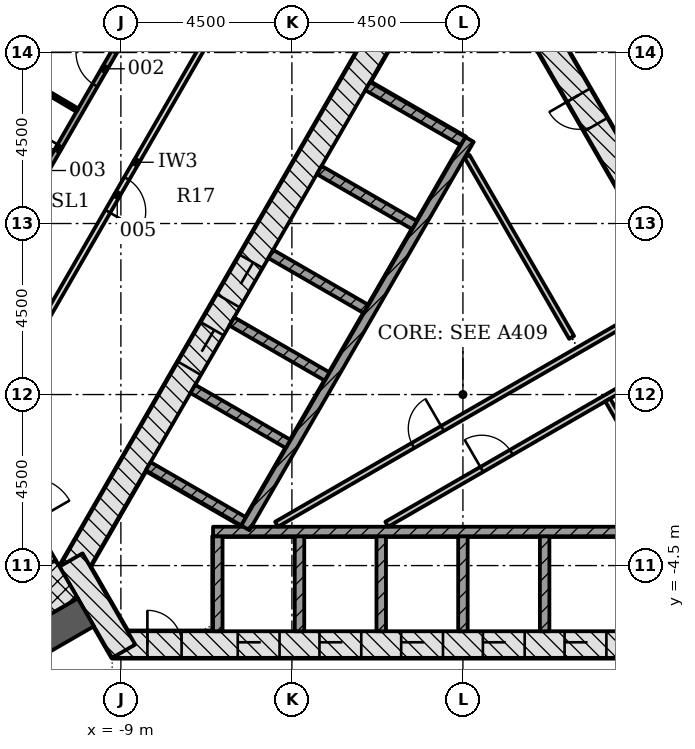
"""IFC4 building model, lengths in metres.
Left out: names, types, materials, properties, quantities, classifications, styles, units other than length and angle.
Written with IfcOpenShell. Run it as: python <this file> out.ifc"""

import sys

from ifc_helpers import new_model, si_unit, direction, frame, frame_2d, origin, place, context, subcontext, project, spatial, rectangle, extrude, element, fill, save


model = new_model("IFC4")
c1 = context("Model", 3, precision=1e-05, world=origin(), true_north=direction((0.0, 1.0)))
c2 = subcontext(c1, "Body", "Model", "MODEL_VIEW")
j1 = project(units=[si_unit("LENGTHUNIT", "METRE"), si_unit("PLANEANGLEUNIT", "RADIAN")], contexts=[c1])
p1 = place(None, origin())
s1 = spatial("IfcSite", under=j1, at=p1, CompositionType="ELEMENT")
p2 = place(p1, origin())
s2 = spatial("IfcBuilding", under=s1, at=p2, CompositionType="ELEMENT")
p3 = place(p2, frame((0.0, 0.0, 58.2)))
s3 = spatial("IfcBuildingStorey", under=s2, at=p3, CompositionType="ELEMENT", Elevation=58.2)
p4 = place(p3, frame((-9.229, -6.578, -0.2), z_axis=(0.0, 0.0, 1.0), x_axis=(1.0, 0.0, 0.0)))
e1 = element("IfcWall", 1, at=p4, inside=s3, PredefinedType="SHEAR", context=c2, shape_type="SweptSolid", body=[
    extrude(rectangle(XDim=18.458, YDim=0.7, at=frame_2d((9.229, 0.0))), origin(), (0.0, 0.0, 1.0), 3.6),
])
p5 = place(p4, frame((3.304, 0.0, 0.2)))
e2 = element("IfcOpeningElement", 2, at=p5, cuts=e1, PredefinedType="OPENING", context=c2, shape_type="SweptSolid", body=[
    extrude(rectangle(XDim=1.1, YDim=2.1, at=frame_2d((0.55, 1.05))), frame((0.0, 0.36, 0.0), z_axis=(0.0, -1.0, 0.0), x_axis=(1.0, 0.0, 0.0)), (0.0, 0.0, 1.0), 0.72),
])
p6 = place(p4, frame((5.454, 0.0, 0.2)))
e3 = element("IfcOpeningElement", 3, at=p6, cuts=e1, PredefinedType="OPENING", context=c2, shape_type="SweptSolid", body=[
    extrude(rectangle(XDim=1.1, YDim=2.1, at=frame_2d((0.55, 1.05))), frame((0.0, 0.36, 0.0), z_axis=(0.0, -1.0, 0.0), x_axis=(1.0, 0.0, 0.0)), (0.0, 0.0, 1.0), 0.72),
])
p7 = place(p4, frame((7.604, 0.0, 0.2)))
e4 = element("IfcOpeningElement", 4, at=p7, cuts=e1, PredefinedType="OPENING", context=c2, shape_type="SweptSolid", body=[
    extrude(rectangle(XDim=1.1, YDim=2.1, at=frame_2d((0.55, 1.05))), frame((0.0, 0.36, 0.0), z_axis=(0.0, -1.0, 0.0), x_axis=(1.0, 0.0, 0.0)), (0.0, 0.0, 1.0), 0.72),
])
p8 = place(p4, frame((9.754, 0.0, 0.2)))
e5 = element("IfcOpeningElement", 5, at=p8, cuts=e1, PredefinedType="OPENING", context=c2, shape_type="SweptSolid", body=[
    extrude(rectangle(XDim=1.1, YDim=2.1, at=frame_2d((0.55, 1.05))), frame((0.0, 0.36, 0.0), z_axis=(0.0, -1.0, 0.0), x_axis=(1.0, 0.0, 0.0)), (0.0, 0.0, 1.0), 0.72),
])
p9 = place(p4, frame((11.904, 0.0, 0.2)))
e6 = element("IfcOpeningElement", 6, at=p9, cuts=e1, PredefinedType="OPENING", context=c2, shape_type="SweptSolid", body=[
    extrude(rectangle(XDim=1.1, YDim=2.1, at=frame_2d((0.55, 1.05))), frame((0.0, 0.36, 0.0), z_axis=(0.0, -1.0, 0.0), x_axis=(1.0, 0.0, 0.0)), (0.0, 0.0, 1.0), 0.72),
])
p10 = place(p4, frame((14.054, 0.0, 0.2)))
e7 = element("IfcOpeningElement", 7, at=p10, cuts=e1, PredefinedType="OPENING", context=c2, shape_type="SweptSolid", body=[
    extrude(rectangle(XDim=1.1, YDim=2.1, at=frame_2d((0.55, 1.05))), frame((0.0, 0.36, 0.0), z_axis=(0.0, -1.0, 0.0), x_axis=(1.0, 0.0, 0.0)), (0.0, 0.0, 1.0), 0.72),
])
p11 = place(p4, frame((0.926, 0.0, 0.2)))
e8 = element("IfcOpeningElement", 8, at=p11, cuts=e1, PredefinedType="OPENING", context=c2, shape_type="SweptSolid", body=[
    extrude(rectangle(XDim=0.9, YDim=2.1, at=frame_2d((0.45, 1.05))), frame((0.0, 0.36, 0.0), z_axis=(0.0, -1.0, 0.0), x_axis=(1.0, 0.0, 0.0)), (0.0, 0.0, 1.0), 0.72),
])
p12 = place(p3, frame((10.311, -4.703, -0.2), z_axis=(0.0, 0.0, 1.0), x_axis=(-0.500001446645, 0.866024568562, 0.0)))
e9 = element("IfcWall", 9, at=p12, inside=s3, PredefinedType="SHEAR", context=c2, shape_type="SweptSolid", body=[
    extrude(rectangle(XDim=18.458, YDim=0.7, at=frame_2d((9.229, 0.0))), origin(), (0.0, 0.0, 1.0), 3.6),
])
p13 = place(p12, frame((7.5, 0.0, 0.2)))
e10 = element("IfcOpeningElement", 10, at=p13, cuts=e9, PredefinedType="OPENING", context=c2, shape_type="SweptSolid", body=[
    extrude(rectangle(XDim=1.0, YDim=2.1, at=frame_2d((0.5, 1.05))), frame((0.0, 0.36, 0.0), z_axis=(0.0, -1.0, 0.0), x_axis=(1.0, 0.0, 0.0)), (0.0, 0.0, 1.0), 0.72),
])
p14 = place(p12, frame((1.852, 0.0, 0.2)))
e11 = element("IfcOpeningElement", 11, at=p14, cuts=e9, PredefinedType="OPENING", context=c2, shape_type="SweptSolid", body=[
    extrude(rectangle(XDim=0.9, YDim=2.1, at=frame_2d((0.45, 1.05))), frame((0.0, 0.36, 0.0), z_axis=(0.0, -1.0, 0.0), x_axis=(1.0, 0.0, 0.0)), (0.0, 0.0, 1.0), 0.72),
])
p15 = place(p12, frame((5.238, 0.0, 0.2)))
e12 = element("IfcOpeningElement", 12, at=p15, cuts=e9, PredefinedType="OPENING", context=c2, shape_type="SweptSolid", body=[
    extrude(rectangle(XDim=1.0, YDim=2.1, at=frame_2d((0.5, 1.05))), frame((0.0, 0.36, 0.0), z_axis=(0.0, -1.0, 0.0), x_axis=(1.0, 0.0, 0.0)), (0.0, 0.0, 1.0), 0.72),
])
p16 = place(p12, frame((13.63, 0.0, 0.2)))
e13 = element("IfcOpeningElement", 13, at=p16, cuts=e9, PredefinedType="OPENING", context=c2, shape_type="SweptSolid", body=[
    extrude(rectangle(XDim=0.9, YDim=2.1, at=frame_2d((0.45, 1.05))), frame((0.0, 0.36, 0.0), z_axis=(0.0, -1.0, 0.0), x_axis=(1.0, 0.0, 0.0)), (0.0, 0.0, 1.0), 0.72),
])
p17 = place(p3, frame((-1.083, 11.281, -0.2), z_axis=(0.0, 0.0, 1.0), x_axis=(-0.500001446645, -0.866024568562, 0.0)))
e14 = element("IfcWall", 14, at=p17, inside=s3, PredefinedType="SHEAR", context=c2, shape_type="SweptSolid", body=[
    extrude(rectangle(XDim=18.458, YDim=0.7, at=frame_2d((9.229, 0.0))), origin(), (0.0, 0.0, 1.0), 3.6),
])
p18 = place(p17, frame((8.979, 0.0, 0.2)))
e15 = element("IfcOpeningElement", 15, at=p18, cuts=e14, PredefinedType="OPENING", context=c2, shape_type="SweptSolid", body=[
    extrude(rectangle(XDim=1.2, YDim=2.1, at=frame_2d((0.6, 1.05))), frame((0.0, 0.36, 0.0), z_axis=(0.0, -1.0, 0.0), x_axis=(1.0, 0.0, 0.0)), (0.0, 0.0, 1.0), 0.72),
])
p19 = place(p17, frame((11.029, 0.0, 0.2)))
e16 = element("IfcOpeningElement", 16, at=p19, cuts=e14, PredefinedType="OPENING", context=c2, shape_type="SweptSolid", body=[
    extrude(rectangle(XDim=1.2, YDim=2.1, at=frame_2d((0.6, 1.05))), frame((0.0, 0.36, 0.0), z_axis=(0.0, -1.0, 0.0), x_axis=(1.0, 0.0, 0.0)), (0.0, 0.0, 1.0), 0.72),
])
p20 = place(p3, frame((-10.311, -4.353, -0.2), z_axis=(0.0, 0.0, 1.0), x_axis=(0.500042739161, -0.866000726912, 0.0)))
e17 = element("IfcWall", 17, at=p20, inside=s3, PredefinedType="SHEAR", context=c2, shape_type="SweptSolid", body=[
    extrude(rectangle(XDim=2.771, YDim=0.7, at=frame_2d((1.386, 0.0))), origin(), (0.0, 0.0, 1.0), 3.6),
])
p21 = place(p3, frame((-9.922, -5.728, -0.2), z_axis=(0.0, 0.0, 1.0), x_axis=(-0.866030067197, -0.499991922645, 0.0)))
e18 = element("IfcWall", 18, at=p21, inside=s3, PredefinedType="SHEAR", context=c2, shape_type="SweptSolid", body=[
    extrude(rectangle(XDim=13.698, YDim=0.85, at=frame_2d((6.849, 0.0))), origin(), (0.0, 0.0, 1.0), 3.6),
])
for number, where, z_axis, x_axis in (
    (19, (-6.45, -6.228, -0.2), (0.0, 0.0, 1.0), (0.0, 1.0, 0.0)),
    (20, (-4.3, -6.228, -0.2), (0.0, 0.0, 1.0), (0.0, 1.0, 0.0)),
    (21, (-2.15, -6.228, -0.2), (0.0, 0.0, 1.0), (0.0, 1.0, 0.0)),
    (22, (0.0, -6.228, -0.2), (0.0, 0.0, 1.0), (0.0, 1.0, 0.0)),
    (23, (2.15, -6.228, -0.2), (0.0, 0.0, 1.0), (0.0, 1.0, 0.0)),
):
    element("IfcWall", number, at=place(p3, frame(where, z_axis=z_axis, x_axis=x_axis)), inside=s3, PredefinedType="PARTITIONING", context=c2, shape_type="SweptSolid", body=[
        extrude(rectangle(XDim=2.5, YDim=0.25, at=frame_2d((1.25, 0.0))), origin(), (0.0, 0.0, 1.0), 3.6),
    ])
p22 = place(p3, frame((-6.575, -3.603, 0.0), z_axis=(0.0, 0.0, 1.0), x_axis=(1.0, 0.0, 0.0)))
e24 = element("IfcWall", 24, at=p22, inside=s3, PredefinedType="PARTITIONING", context=c2, shape_type="SweptSolid", body=[
    extrude(rectangle(XDim=13.15, YDim=0.25, at=frame_2d((6.575, 0.0))), origin(), (0.0, 0.0, 1.0), 3.4),
])
p23 = place(p3, frame((-2.506, 8.115, -0.2), z_axis=(0.0, 0.0, 1.0), x_axis=(0.865996321171, -0.50005036918, 0.0)))
e25 = element("IfcWall", 25, at=p23, inside=s3, PredefinedType="PARTITIONING", context=c2, shape_type="SweptSolid", body=[
    extrude(rectangle(XDim=2.9, YDim=0.25, at=frame_2d((1.45, 0.0))), origin(), (0.0, 0.0, 1.0), 3.6),
])
for number, where, z_axis, x_axis in (
    (26, (-3.781, 5.907, -0.2), (0.0, 0.0, 1.0), (0.866, -0.5, 0.0)),
    (27, (-5.056, 3.699, -0.2), (0.0, 0.0, 1.0), (0.866, -0.5, 0.0)),
    (28, (-6.081, 1.923, -0.2), (0.0, 0.0, 1.0), (0.866, -0.5, 0.0)),
    (29, (-7.106, 0.148, -0.2), (0.0, 0.0, 1.0), (0.866, -0.5, 0.0)),
    (30, (-8.281, -1.887, -0.2), (0.0, 0.0, 1.0), (0.866, -0.5, 0.0)),
):
    element("IfcWall", number, at=place(p3, frame(where, z_axis=z_axis, x_axis=x_axis)), inside=s3, PredefinedType="PARTITIONING", context=c2, shape_type="SweptSolid", body=[
        extrude(rectangle(XDim=2.9, YDim=0.25, at=frame_2d((1.45, 0.0))), origin(), (0.0, 0.0, 1.0), 3.6),
    ])
p24 = place(p3, frame((0.176, 6.711, 0.0), z_axis=(0.0, 0.0, 1.0), x_axis=(-0.500004227369, -0.866022963098, 0.0)))
e31 = element("IfcWall", 31, at=p24, inside=s3, PredefinedType="PARTITIONING", context=c2, shape_type="SweptSolid", body=[
    extrude(rectangle(XDim=11.8, YDim=0.25, at=frame_2d((5.9, 0.0))), origin(), (0.0, 0.0, 1.0), 3.4),
])
p25 = place(p3, frame((-4.904, -3.413, 0.0), z_axis=(0.0, 0.0, 1.0), x_axis=(0.866020716117, 0.500008119189, 0.0)))
e32 = element("IfcWall", 32, at=p25, inside=s3, PredefinedType="PARTITIONING", context=c2, shape_type="SweptSolid", body=[
    extrude(rectangle(XDim=12.182, YDim=0.15, at=frame_2d((6.091, 0.0))), origin(), (0.0, 0.0, 1.0), 3.4),
])
p26 = place(p25, frame((4.142, 0.0, 0.0)))
e33 = element("IfcOpeningElement", 33, at=p26, cuts=e32, PredefinedType="OPENING", context=c2, shape_type="SweptSolid", body=[
    extrude(rectangle(XDim=0.9, YDim=2.1, at=frame_2d((0.45, 1.05))), frame((0.0, 0.085, 0.0), z_axis=(0.0, -1.0, 0.0), x_axis=(1.0, 0.0, 0.0)), (0.0, 0.0, 1.0), 0.17),
])
p27 = place(p3, frame((-2.004, -3.413, 0.0), z_axis=(0.0, 0.0, 1.0), x_axis=(0.866030034802, 0.499991978756, 0.0)))
e34 = element("IfcWall", 34, at=p27, inside=s3, PredefinedType="PARTITIONING", context=c2, shape_type="SweptSolid", body=[
    extrude(rectangle(XDim=9.671, YDim=0.15, at=frame_2d((4.835, 0.0))), origin(), (0.0, 0.0, 1.0), 3.4),
])
p28 = place(p27, frame((2.886, 0.0, 0.0)))
e35 = element("IfcOpeningElement", 35, at=p28, cuts=e34, PredefinedType="OPENING", context=c2, shape_type="SweptSolid", body=[
    extrude(rectangle(XDim=0.9, YDim=2.1, at=frame_2d((0.45, 1.05))), frame((0.0, 0.085, 0.0), z_axis=(0.0, -1.0, 0.0), x_axis=(1.0, 0.0, 0.0)), (0.0, 0.0, 1.0), 0.17),
])
p29 = place(p3, frame((2.86, 1.503, 0.0), z_axis=(0.0, 0.0, 1.0), x_axis=(-0.500014382217, 0.866017100048, 0.0)))
e36 = element("IfcWall", 36, at=p29, inside=s3, PredefinedType="PARTITIONING", context=c2, shape_type="SweptSolid", body=[
    extrude(rectangle(XDim=5.502, YDim=0.15, at=frame_2d((2.751, 0.0))), origin(), (0.0, 0.0, 1.0), 3.4),
])
p30 = place(p3, frame((5.713, -3.439, 0.0), z_axis=(0.0, 0.0, 1.0), x_axis=(-0.499981559197, 0.866036050325, 0.0)))
e37 = element("IfcWall", 37, at=p30, inside=s3, PredefinedType="PARTITIONING", context=c2, shape_type="SweptSolid", body=[
    extrude(rectangle(XDim=3.806, YDim=0.15, at=frame_2d((1.903, 0.0))), origin(), (0.0, 0.0, 1.0), 3.4),
])
p31 = place(p3, frame((-12.576, -1.331, -0.2), z_axis=(0.0, 0.0, 1.0), x_axis=(0.499970499736, -0.8660424351, 0.0)))
e38 = element("IfcWall", 38, at=p31, inside=s3, PredefinedType="SHEAR", context=c2, shape_type="SweptSolid", body=[
    extrude(rectangle(XDim=3.55, YDim=0.2, at=frame_2d((1.775, 0.0))), origin(), (0.0, 0.0, 1.0), 3.6),
])
p32 = place(p31, frame((1.175, 0.0, 0.2)))
e39 = element("IfcOpeningElement", 39, at=p32, cuts=e38, PredefinedType="OPENING", context=c2, shape_type="SweptSolid", body=[
    extrude(rectangle(XDim=1.2, YDim=2.1, at=frame_2d((0.6, 1.05))), frame((0.0, 0.11, 0.0), z_axis=(0.0, -1.0, 0.0), x_axis=(1.0, 0.0, 0.0)), (0.0, 0.0, 1.0), 0.22),
])
p33 = place(p3, frame((-10.424, -4.858, -0.2), z_axis=(0.0, 0.0, 1.0), x_axis=(-0.866033125095, -0.499986626058, 0.0)))
e40 = element("IfcWall", 40, at=p33, inside=s3, PredefinedType="SHEAR", context=c2, shape_type="SweptSolid", body=[
    extrude(rectangle(XDim=7.2, YDim=1.161, at=frame_2d((3.6, 0.0))), origin(), (0.0, 0.0, 1.0), 3.6),
])
p34 = place(p3, frame((-16.169, -3.099, 0.0), z_axis=(0.0, 0.0, 1.0), x_axis=(0.499999805269, 0.866025516212, 0.0)))
e41 = element("IfcWall", 41, at=p34, inside=s3, PredefinedType="PARTITIONING", context=c2, shape_type="SweptSolid", body=[
    extrude(rectangle(XDim=22.097, YDim=0.15, at=frame_2d((11.049, 0.0))), origin(), (0.0, 0.0, 1.0), 2.778),
])
p35 = place(p34, frame((15.558, 0.0, 0.0)))
e42 = element("IfcOpeningElement", 42, at=p35, cuts=e41, PredefinedType="OPENING", context=c2, shape_type="SweptSolid", body=[
    extrude(rectangle(XDim=1.0, YDim=2.1, at=frame_2d((0.5, 1.05))), frame((0.0, 0.085, 0.0), z_axis=(0.0, -1.0, 0.0), x_axis=(1.0, 0.0, 0.0)), (0.0, 0.0, 1.0), 0.17),
])
p36 = place(p34, frame((12.976, 0.0, 0.0)))
e43 = element("IfcOpeningElement", 43, at=p36, cuts=e41, PredefinedType="OPENING", context=c2, shape_type="SweptSolid", body=[
    extrude(rectangle(XDim=1.0, YDim=2.1, at=frame_2d((0.5, 1.05))), frame((0.0, 0.085, 0.0), z_axis=(0.0, -1.0, 0.0), x_axis=(1.0, 0.0, 0.0)), (0.0, 0.0, 1.0), 0.17),
])
p37 = place(p34, frame((9.635, 0.0, 0.0)))
e44 = element("IfcOpeningElement", 44, at=p37, cuts=e41, PredefinedType="OPENING", context=c2, shape_type="SweptSolid", body=[
    extrude(rectangle(XDim=1.5, YDim=2.1, at=frame_2d((0.75, 1.05))), frame((0.0, 0.085, 0.0), z_axis=(0.0, -1.0, 0.0), x_axis=(1.0, 0.0, 0.0)), (0.0, 0.0, 1.0), 0.17),
])
p38 = place(p34, frame((3.404, 0.0, 0.0)))
e45 = element("IfcOpeningElement", 45, at=p38, cuts=e41, PredefinedType="OPENING", context=c2, shape_type="SweptSolid", body=[
    extrude(rectangle(XDim=1.5, YDim=2.1, at=frame_2d((0.75, 1.05))), frame((0.0, 0.085, 0.0), z_axis=(0.0, -1.0, 0.0), x_axis=(1.0, 0.0, 0.0)), (0.0, 0.0, 1.0), 0.17),
])
p39 = place(p3, frame((-4.407, 13.374, 0.0), z_axis=(0.0, 0.0, 1.0), x_axis=(-0.499997181693, -0.866027030928, 0.0)))
e46 = element("IfcWall", 46, at=p39, inside=s3, PredefinedType="PARTITIONING", context=c2, shape_type="SweptSolid", body=[
    extrude(rectangle(XDim=16.77, YDim=0.15, at=frame_2d((8.385, 0.0))), origin(), (0.0, 0.0, 1.0), 2.778),
])
p40 = place(p39, frame((8.879, 0.0, 0.0)))
e47 = element("IfcOpeningElement", 47, at=p40, cuts=e46, PredefinedType="OPENING", context=c2, shape_type="SweptSolid", body=[
    extrude(rectangle(XDim=1.0, YDim=2.1, at=frame_2d((0.5, 1.05))), frame((0.0, 0.085, 0.0), z_axis=(0.0, -1.0, 0.0), x_axis=(1.0, 0.0, 0.0)), (0.0, 0.0, 1.0), 0.17),
])
p41 = place(p3, frame((-11.333, -7.034, 0.0), z_axis=(0.0, 0.0, 1.0), x_axis=(0.499981853705, -0.866035880299, 0.0)))
e48 = element("IfcWall", 48, at=p41, inside=s3, PredefinedType="PARTITIONING", context=c2, shape_type="SweptSolid", body=[
    extrude(rectangle(XDim=2.118, YDim=0.15, at=frame_2d((1.059, 0.0))), origin(), (0.0, 0.0, 1.0), 2.778),
])
p42 = place(p3, frame((-9.478, 13.074, 0.0), z_axis=(0.0, 0.0, 1.0), x_axis=(-0.508234581351, -0.86121867741, 0.0)))
e49 = element("IfcWall", 49, at=p42, inside=s3, PredefinedType="PARTITIONING", context=c2, shape_type="SweptSolid", body=[
    extrude(rectangle(XDim=5.155, YDim=0.1, at=frame_2d((2.577, 0.0))), origin(), (0.0, 0.0, 1.0), 2.778),
])
p43 = place(p3, frame((-12.055, 8.61, 0.0), z_axis=(0.0, 0.0, 1.0), x_axis=(0.861222482917, -0.508228132749, 0.0)))
e50 = element("IfcWall", 50, at=p43, inside=s3, PredefinedType="PARTITIONING", context=c2, shape_type="SweptSolid", body=[
    extrude(rectangle(XDim=2.216, YDim=0.1, at=frame_2d((1.108, 0.0))), origin(), (0.0, 0.0, 1.0), 3.4),
])
p44 = place(p5, origin())
e51 = element("IfcDoor", 51, at=p44, inside=s3, OperationType="DOUBLE_DOOR_SLIDING", PredefinedType="DOOR", context=c2, shape_type="SweptSolid", body=[
    extrude(rectangle(XDim=1.1, YDim=2.1, at=frame_2d((0.55, 1.05))), frame((0.0, 0.025, 0.0), z_axis=(0.0, -1.0, 0.0), x_axis=(1.0, 0.0, 0.0)), (0.0, 0.0, 1.0), 0.05),
])
fill(e2, e51)
p45 = place(p6, origin())
e52 = element("IfcDoor", 52, at=p45, inside=s3, OperationType="DOUBLE_DOOR_SLIDING", PredefinedType="DOOR", context=c2, shape_type="SweptSolid", body=[
    extrude(rectangle(XDim=1.1, YDim=2.1, at=frame_2d((0.55, 1.05))), frame((0.0, 0.025, 0.0), z_axis=(0.0, -1.0, 0.0), x_axis=(1.0, 0.0, 0.0)), (0.0, 0.0, 1.0), 0.05),
])
fill(e3, e52)
p46 = place(p7, origin())
e53 = element("IfcDoor", 53, at=p46, inside=s3, OperationType="DOUBLE_DOOR_SLIDING", PredefinedType="DOOR", context=c2, shape_type="SweptSolid", body=[
    extrude(rectangle(XDim=1.1, YDim=2.1, at=frame_2d((0.55, 1.05))), frame((0.0, 0.025, 0.0), z_axis=(0.0, -1.0, 0.0), x_axis=(1.0, 0.0, 0.0)), (0.0, 0.0, 1.0), 0.05),
])
fill(e4, e53)
p47 = place(p8, origin())
e54 = element("IfcDoor", 54, at=p47, inside=s3, OperationType="DOUBLE_DOOR_SLIDING", PredefinedType="DOOR", context=c2, shape_type="SweptSolid", body=[
    extrude(rectangle(XDim=1.1, YDim=2.1, at=frame_2d((0.55, 1.05))), frame((0.0, 0.025, 0.0), z_axis=(0.0, -1.0, 0.0), x_axis=(1.0, 0.0, 0.0)), (0.0, 0.0, 1.0), 0.05),
])
fill(e5, e54)
p48 = place(p9, origin())
e55 = element("IfcDoor", 55, at=p48, inside=s3, OperationType="DOUBLE_DOOR_SLIDING", PredefinedType="DOOR", context=c2, shape_type="SweptSolid", body=[
    extrude(rectangle(XDim=1.1, YDim=2.1, at=frame_2d((0.55, 1.05))), frame((0.0, 0.025, 0.0), z_axis=(0.0, -1.0, 0.0), x_axis=(1.0, 0.0, 0.0)), (0.0, 0.0, 1.0), 0.05),
])
fill(e6, e55)
p49 = place(p18, origin())
e56 = element("IfcDoor", 56, at=p49, inside=s3, OperationType="DOUBLE_DOOR_SLIDING", PredefinedType="DOOR", context=c2, shape_type="SweptSolid", body=[
    extrude(rectangle(XDim=1.2, YDim=2.1, at=frame_2d((0.6, 1.05))), frame((0.0, 0.025, 0.0), z_axis=(0.0, -1.0, 0.0), x_axis=(1.0, 0.0, 0.0)), (0.0, 0.0, 1.0), 0.05),
])
fill(e15, e56)
p50 = place(p19, origin())
e57 = element("IfcDoor", 57, at=p50, inside=s3, OperationType="DOUBLE_DOOR_SLIDING", PredefinedType="DOOR", context=c2, shape_type="SweptSolid", body=[
    extrude(rectangle(XDim=1.2, YDim=2.1, at=frame_2d((0.6, 1.05))), frame((0.0, 0.025, 0.0), z_axis=(0.0, -1.0, 0.0), x_axis=(1.0, 0.0, 0.0)), (0.0, 0.0, 1.0), 0.05),
])
fill(e16, e57)
p51 = place(p16, origin())
e58 = element("IfcDoor", 58, at=p51, inside=s3, OperationType="SINGLE_SWING_RIGHT", PredefinedType="DOOR", context=c2, shape_type="SweptSolid", body=[
    extrude(rectangle(XDim=0.9, YDim=2.1, at=frame_2d((0.45, 1.05))), frame((0.0, 0.075, 0.0), z_axis=(0.0, -1.0, 0.0), x_axis=(1.0, 0.0, 0.0)), (0.0, 0.0, 1.0), 0.15),
])
fill(e13, e58)
p52 = place(p28, origin())
e59 = element("IfcDoor", 59, at=p52, inside=s3, OperationType="SINGLE_SWING_LEFT", PredefinedType="DOOR", context=c2, shape_type="SweptSolid", body=[
    extrude(rectangle(XDim=0.9, YDim=2.1, at=frame_2d((0.45, 1.05))), frame((0.0, 0.025, 0.0), z_axis=(0.0, -1.0, 0.0), x_axis=(1.0, 0.0, 0.0)), (0.0, 0.0, 1.0), 0.05),
])
fill(e35, e59)
p53 = place(p26, origin())
e60 = element("IfcDoor", 60, at=p53, inside=s3, OperationType="SINGLE_SWING_RIGHT", PredefinedType="DOOR", context=c2, shape_type="SweptSolid", body=[
    extrude(rectangle(XDim=0.9, YDim=2.1, at=frame_2d((0.45, 1.05))), frame((0.0, 0.025, 0.0), z_axis=(0.0, -1.0, 0.0), x_axis=(1.0, 0.0, 0.0)), (0.0, 0.0, 1.0), 0.05),
])
fill(e33, e60)
p54 = place(p11, origin())
e61 = element("IfcDoor", 61, at=p54, inside=s3, OperationType="SINGLE_SWING_LEFT", PredefinedType="DOOR", context=c2, shape_type="SweptSolid", body=[
    extrude(rectangle(XDim=0.9, YDim=2.1, at=frame_2d((0.45, 1.05))), frame((0.0, 0.075, 0.0), z_axis=(0.0, -1.0, 0.0), x_axis=(1.0, 0.0, 0.0)), (0.0, 0.0, 1.0), 0.15),
])
fill(e8, e61)
p55 = place(p36, origin())
e62 = element("IfcDoor", 62, at=p55, inside=s3, OperationType="SINGLE_SWING_RIGHT", PredefinedType="DOOR", context=c2, shape_type="SweptSolid", body=[
    extrude(rectangle(XDim=1.0, YDim=2.1, at=frame_2d((0.5, 1.05))), frame((0.0, 0.025, 0.0), z_axis=(0.0, -1.0, 0.0), x_axis=(1.0, 0.0, 0.0)), (0.0, 0.0, 1.0), 0.05),
])
fill(e43, e62)
p56 = place(p37, origin())
e63 = element("IfcDoor", 63, at=p56, inside=s3, OperationType="DOUBLE_DOOR_SINGLE_SWING", PredefinedType="DOOR", context=c2, shape_type="SweptSolid", body=[
    extrude(rectangle(XDim=1.5, YDim=2.1, at=frame_2d((0.75, 1.05))), frame((0.0, 0.025, 0.0), z_axis=(0.0, -1.0, 0.0), x_axis=(1.0, 0.0, 0.0)), (0.0, 0.0, 1.0), 0.05),
])
fill(e44, e63)
p57 = place(p40, origin())
e64 = element("IfcDoor", 64, at=p57, inside=s3, OperationType="SINGLE_SWING_RIGHT", PredefinedType="DOOR", context=c2, shape_type="SweptSolid", body=[
    extrude(rectangle(XDim=1.0, YDim=2.1, at=frame_2d((0.5, 1.05))), frame((0.0, 0.025, 0.0), z_axis=(0.0, -1.0, 0.0), x_axis=(1.0, 0.0, 0.0)), (0.0, 0.0, 1.0), 0.05),
])
fill(e47, e64)
save(model, sys.argv[1])
